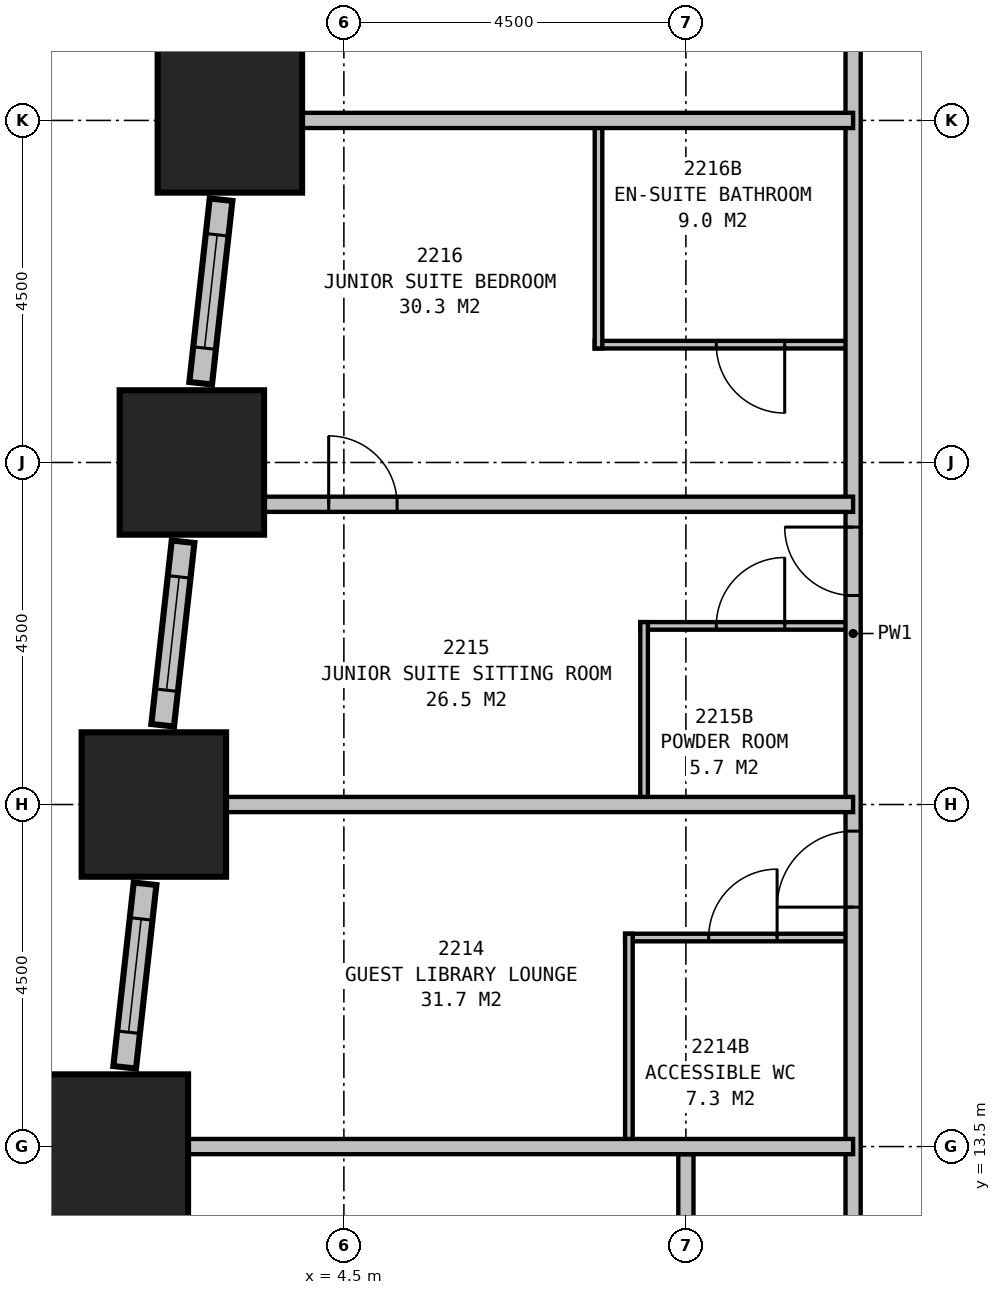
"""IFC4 building model, lengths in metres.
Left out: names, types, materials, properties, quantities, classifications, styles, units other than length and angle.
Written with IfcOpenShell. Run it as: python <this file> out.ifc"""

import sys

from ifc_helpers import new_model, si_unit, direction, frame, frame_2d, origin, origin_2d, place, context, subcontext, project, spatial, rectangle, extrude, element, fill, save


model = new_model("IFC4")
c1 = context("Model", 3, precision=1e-05, world=origin(), true_north=direction((0.0, 1.0)))
c2 = subcontext(c1, "Body", "Model", "MODEL_VIEW")
j1 = project(units=[si_unit("LENGTHUNIT", "METRE"), si_unit("PLANEANGLEUNIT", "RADIAN")], contexts=[c1])
p1 = place(None, origin())
s1 = spatial("IfcSite", under=j1, at=p1, CompositionType="ELEMENT")
p2 = place(p1, origin())
s2 = spatial("IfcBuilding", under=s1, at=p2, CompositionType="ELEMENT")
p3 = place(p2, frame((0.0, 0.0, 89.9)))
s3 = spatial("IfcBuildingStorey", under=s2, at=p3, CompositionType="ELEMENT", Elevation=89.9)
for number, where, z_axis, x_axis in (
    (1, (3.0, 27.0, 0.0), (0.0, 0.0, 1.0), (1.0, 0.0, 0.0)),
    (2, (2.5, 22.5, 0.0), (0.0, 0.0, 1.0), (1.0, 0.0, 0.0)),
    (3, (2.0, 18.0, 0.0), (0.0, 0.0, 1.0), (1.0, 0.0, 0.0)),
    (4, (1.5, 13.5, 0.0), (0.0, 0.0, 1.0), (1.0, 0.0, 0.0)),
):
    element("IfcColumn", number, at=place(p3, frame(where, z_axis=z_axis, x_axis=x_axis)), inside=s3, PredefinedType="COLUMN", context=c2, shape_type="SweptSolid", body=[
        extrude(rectangle(XDim=1.9, YDim=1.9, at=origin_2d()), origin(), (0.0, 0.0, 1.0), 3.5),
    ])
p4 = place(p3, frame((2.884, 25.957, 0.0), z_axis=(0.0, 0.0, 1.0), x_axis=(-0.110343286306, -0.993893535127, 0.0)))
e5 = element("IfcWall", 5, at=p4, inside=s3, PredefinedType="STANDARD", context=c2, shape_type="SweptSolid", body=[
    extrude(rectangle(XDim=2.429, YDim=0.3, at=frame_2d((1.215, 0.0))), origin(), (0.0, 0.0, 1.0), 2.15),
])
p5 = place(p4, frame((0.465, 0.0, 0.5)))
e6 = element("IfcOpeningElement", 6, at=p5, cuts=e5, PredefinedType="OPENING", context=c2, shape_type="SweptSolid", body=[
    extrude(rectangle(XDim=1.5, YDim=1.5, at=frame_2d((0.75, 0.75))), frame((0.0, 0.16, 0.0), z_axis=(0.0, -1.0, 0.0), x_axis=(1.0, 0.0, 0.0)), (0.0, 0.0, 1.0), 0.32),
])
p6 = place(p3, frame((2.384, 21.457, 0.0), z_axis=(0.0, 0.0, 1.0), x_axis=(-0.110343286306, -0.993893535127, 0.0)))
e7 = element("IfcWall", 7, at=p6, inside=s3, PredefinedType="STANDARD", context=c2, shape_type="SweptSolid", body=[
    extrude(rectangle(XDim=2.429, YDim=0.3, at=frame_2d((1.215, 0.0))), origin(), (0.0, 0.0, 1.0), 2.15),
])
p7 = place(p6, frame((0.465, 0.0, 0.5)))
e8 = element("IfcOpeningElement", 8, at=p7, cuts=e7, PredefinedType="OPENING", context=c2, shape_type="SweptSolid", body=[
    extrude(rectangle(XDim=1.5, YDim=1.5, at=frame_2d((0.75, 0.75))), frame((0.0, 0.16, 0.0), z_axis=(0.0, -1.0, 0.0), x_axis=(1.0, 0.0, 0.0)), (0.0, 0.0, 1.0), 0.32),
])
p8 = place(p3, frame((1.884, 16.957, 0.0), z_axis=(0.0, 0.0, 1.0), x_axis=(-0.110343286306, -0.993893535127, 0.0)))
e9 = element("IfcWall", 9, at=p8, inside=s3, PredefinedType="STANDARD", context=c2, shape_type="SweptSolid", body=[
    extrude(rectangle(XDim=2.429, YDim=0.3, at=frame_2d((1.215, 0.0))), origin(), (0.0, 0.0, 1.0), 2.15),
])
p9 = place(p8, frame((0.465, 0.0, 0.5)))
e10 = element("IfcOpeningElement", 10, at=p9, cuts=e9, PredefinedType="OPENING", context=c2, shape_type="SweptSolid", body=[
    extrude(rectangle(XDim=1.5, YDim=1.5, at=frame_2d((0.75, 0.75))), frame((0.0, 0.16, 0.0), z_axis=(0.0, -1.0, 0.0), x_axis=(1.0, 0.0, 0.0)), (0.0, 0.0, 1.0), 0.32),
])
p10 = place(p3, frame((11.2, 10.6, 0.0), z_axis=(0.0, 0.0, 1.0), x_axis=(0.0, 1.0, 0.0)))
e11 = element("IfcWall", 11, at=p10, inside=s3, PredefinedType="PARTITIONING", context=c2, shape_type="SweptSolid", body=[
    extrude(rectangle(XDim=19.3, YDim=0.2, at=frame_2d((9.65, 0.0))), origin(), (0.0, 0.0, 1.0), 3.25),
])
p11 = place(p10, frame((6.05, 0.0, 0.0)))
e12 = element("IfcOpeningElement", 12, at=p11, cuts=e11, PredefinedType="OPENING", context=c2, shape_type="SweptSolid", body=[
    extrude(rectangle(XDim=1.0, YDim=2.1, at=frame_2d((0.5, 1.05))), frame((0.0, 0.11, 0.0), z_axis=(0.0, -1.0, 0.0), x_axis=(1.0, 0.0, 0.0)), (0.0, 0.0, 1.0), 0.22),
])
p12 = place(p10, frame((10.15, 0.0, 0.0)))
e13 = element("IfcOpeningElement", 13, at=p12, cuts=e11, PredefinedType="OPENING", context=c2, shape_type="SweptSolid", body=[
    extrude(rectangle(XDim=0.9, YDim=2.1, at=frame_2d((0.45, 1.05))), frame((0.0, 0.11, 0.0), z_axis=(0.0, -1.0, 0.0), x_axis=(1.0, 0.0, 0.0)), (0.0, 0.0, 1.0), 0.22),
])
p13 = place(p3, frame((11.2, 18.0, 0.0), z_axis=(0.0, 0.0, 1.0), x_axis=(-1.0, 0.0, 0.0)))
e14 = element("IfcWall", 14, at=p13, inside=s3, PredefinedType="PARTITIONING", context=c2, shape_type="SweptSolid", body=[
    extrude(rectangle(XDim=9.199, YDim=0.2, at=frame_2d((4.6, 0.0))), origin(), (0.0, 0.0, 1.0), 2.25),
])
p14 = place(p3, frame((11.2, 21.95, 0.0), z_axis=(0.0, 0.0, 1.0), x_axis=(-1.0, 0.0, 0.0)))
e15 = element("IfcWall", 15, at=p14, inside=s3, PredefinedType="PARTITIONING", context=c2, shape_type="SweptSolid", body=[
    extrude(rectangle(XDim=8.76, YDim=0.2, at=frame_2d((4.38, 0.0))), origin(), (0.0, 0.0, 1.0), 3.25),
])
p15 = place(p14, frame((6.9, 0.0, 0.0), z_axis=(0.0, 0.0, 1.0), x_axis=(-1.0, 0.0, 0.0)))
e16 = element("IfcOpeningElement", 16, at=p15, cuts=e15, PredefinedType="OPENING", context=c2, shape_type="SweptSolid", body=[
    extrude(rectangle(XDim=0.9, YDim=2.1, at=frame_2d((0.45, 1.05))), frame((0.0, 0.11, 0.0), z_axis=(0.0, -1.0, 0.0), x_axis=(1.0, 0.0, 0.0)), (0.0, 0.0, 1.0), 0.22),
])
p16 = place(p3, frame((8.25, 13.5, 0.0), z_axis=(0.0, 0.0, 1.0), x_axis=(0.0, 1.0, 0.0)))
e17 = element("IfcWall", 17, at=p16, inside=s3, PredefinedType="PLUMBINGWALL", context=c2, shape_type="SweptSolid", body=[
    extrude(rectangle(XDim=2.8, YDim=0.1, at=frame_2d((1.4, 0.0))), origin(), (0.0, 0.0, 1.0), 3.25),
])
p17 = place(p3, frame((11.2, 16.25, 0.0), z_axis=(0.0, 0.0, 1.0), x_axis=(-1.0, 0.0, 0.0)))
e18 = element("IfcWall", 18, at=p17, inside=s3, PredefinedType="PLUMBINGWALL", context=c2, shape_type="SweptSolid", body=[
    extrude(rectangle(XDim=3.0, YDim=0.1, at=frame_2d((1.5, 0.0))), origin(), (0.0, 0.0, 1.0), 3.25),
])
p18 = place(p17, frame((1.9, 0.0, 0.0), z_axis=(0.0, 0.0, 1.0), x_axis=(-1.0, 0.0, 0.0)))
e19 = element("IfcOpeningElement", 19, at=p18, cuts=e18, PredefinedType="OPENING", context=c2, shape_type="SweptSolid", body=[
    extrude(rectangle(XDim=0.9, YDim=2.1, at=frame_2d((0.45, 1.05))), frame((0.0, 0.06, 0.0), z_axis=(0.0, -1.0, 0.0), x_axis=(1.0, 0.0, 0.0)), (0.0, 0.0, 1.0), 0.12),
])
p19 = place(p3, frame((8.45, 18.0, 0.0), z_axis=(0.0, 0.0, 1.0), x_axis=(0.0, 1.0, 0.0)))
e20 = element("IfcWall", 20, at=p19, inside=s3, PredefinedType="PLUMBINGWALL", context=c2, shape_type="SweptSolid", body=[
    extrude(rectangle(XDim=2.4, YDim=0.1, at=frame_2d((1.2, 0.0))), origin(), (0.0, 0.0, 1.0), 3.25),
])
p20 = place(p3, frame((11.2, 20.35, 0.0), z_axis=(0.0, 0.0, 1.0), x_axis=(-1.0, 0.0, 0.0)))
e21 = element("IfcWall", 21, at=p20, inside=s3, PredefinedType="PLUMBINGWALL", context=c2, shape_type="SweptSolid", body=[
    extrude(rectangle(XDim=2.8, YDim=0.1, at=frame_2d((1.4, 0.0))), origin(), (0.0, 0.0, 1.0), 3.25),
])
p21 = place(p20, frame((1.8, 0.0, 0.0), z_axis=(0.0, 0.0, 1.0), x_axis=(-1.0, 0.0, 0.0)))
e22 = element("IfcOpeningElement", 22, at=p21, cuts=e21, PredefinedType="OPENING", context=c2, shape_type="SweptSolid", body=[
    extrude(rectangle(XDim=0.9, YDim=2.1, at=frame_2d((0.45, 1.05))), frame((0.0, 0.06, 0.0), z_axis=(0.0, -1.0, 0.0), x_axis=(1.0, 0.0, 0.0)), (0.0, 0.0, 1.0), 0.12),
])
p22 = place(p3, frame((7.85, 24.0, 0.0), z_axis=(0.0, 0.0, 1.0), x_axis=(0.0, 1.0, 0.0)))
e23 = element("IfcWall", 23, at=p22, inside=s3, PredefinedType="PLUMBINGWALL", context=c2, shape_type="SweptSolid", body=[
    extrude(rectangle(XDim=3.0, YDim=0.1, at=frame_2d((1.5, 0.0))), origin(), (0.0, 0.0, 1.0), 3.25),
])
p23 = place(p3, frame((11.2, 24.05, 0.0), z_axis=(0.0, 0.0, 1.0), x_axis=(-1.0, 0.0, 0.0)))
e24 = element("IfcWall", 24, at=p23, inside=s3, PredefinedType="PLUMBINGWALL", context=c2, shape_type="SweptSolid", body=[
    extrude(rectangle(XDim=3.4, YDim=0.1, at=frame_2d((1.7, 0.0))), origin(), (0.0, 0.0, 1.0), 3.25),
])
p24 = place(p23, frame((0.9, 0.0, 0.0)))
e25 = element("IfcOpeningElement", 25, at=p24, cuts=e24, PredefinedType="OPENING", context=c2, shape_type="SweptSolid", body=[
    extrude(rectangle(XDim=0.9, YDim=2.1, at=frame_2d((0.45, 1.05))), frame((0.0, 0.06, 0.0), z_axis=(0.0, -1.0, 0.0), x_axis=(1.0, 0.0, 0.0)), (0.0, 0.0, 1.0), 0.12),
])
p25 = place(p3, frame((11.2, 13.5, 0.0), z_axis=(0.0, 0.0, 1.0), x_axis=(-1.0, 0.0, 0.0)))
e26 = element("IfcWall", 26, at=p25, inside=s3, PredefinedType="PARTITIONING", context=c2, shape_type="SweptSolid", body=[
    extrude(rectangle(XDim=9.921, YDim=0.2, at=frame_2d((4.96, 0.0))), origin(), (0.0, 0.0, 1.0), 1.95),
])
p26 = place(p3, frame((9.0, 4.6, 0.0), z_axis=(0.0, 0.0, 1.0), x_axis=(0.0, 1.0, 0.0)))
e27 = element("IfcWall", 27, at=p26, inside=s3, PredefinedType="PARTITIONING", context=c2, shape_type="SweptSolid", body=[
    extrude(rectangle(XDim=8.8, YDim=0.2, at=frame_2d((4.4, 0.0))), origin(), (0.0, 0.0, 1.0), 2.25),
])
p27 = place(p26, frame((4.05, 0.0, 0.0)))
e28 = element("IfcOpeningElement", 28, at=p27, cuts=e27, PredefinedType="OPENING", context=c2, shape_type="SweptSolid", body=[
    extrude(rectangle(XDim=0.9, YDim=2.1, at=frame_2d((0.45, 1.05))), frame((0.0, 0.11, 0.0), z_axis=(0.0, -1.0, 0.0), x_axis=(1.0, 0.0, 0.0)), (0.0, 0.0, 1.0), 0.22),
])
p28 = place(p3, frame((11.2, 27.0, 0.0), z_axis=(0.0, 0.0, 1.0), x_axis=(-1.0, 0.0, 0.0)))
e29 = element("IfcWall", 29, at=p28, inside=s3, PredefinedType="PARTITIONING", context=c2, shape_type="SweptSolid", body=[
    extrude(rectangle(XDim=7.977, YDim=0.2, at=frame_2d((3.988, 0.0))), origin(), (0.0, 0.0, 1.0), 1.95),
])
p29 = place(p5, origin())
e30 = element("IfcWindow", 30, at=p29, inside=s3, PartitioningType="SINGLE_PANEL", PredefinedType="WINDOW", context=c2, shape_type="SweptSolid", body=[
    extrude(rectangle(XDim=1.5, YDim=1.5, at=frame_2d((0.75, 0.75))), frame((0.0, 0.03, 0.0), z_axis=(0.0, -1.0, 0.0), x_axis=(1.0, 0.0, 0.0)), (0.0, 0.0, 1.0), 0.06),
])
fill(e6, e30)
p30 = place(p7, origin())
e31 = element("IfcWindow", 31, at=p30, inside=s3, PartitioningType="SINGLE_PANEL", PredefinedType="WINDOW", context=c2, shape_type="SweptSolid", body=[
    extrude(rectangle(XDim=1.5, YDim=1.5, at=frame_2d((0.75, 0.75))), frame((0.0, 0.03, 0.0), z_axis=(0.0, -1.0, 0.0), x_axis=(1.0, 0.0, 0.0)), (0.0, 0.0, 1.0), 0.06),
])
fill(e8, e31)
p31 = place(p9, origin())
e32 = element("IfcWindow", 32, at=p31, inside=s3, PartitioningType="SINGLE_PANEL", PredefinedType="WINDOW", context=c2, shape_type="SweptSolid", body=[
    extrude(rectangle(XDim=1.5, YDim=1.5, at=frame_2d((0.75, 0.75))), frame((0.0, 0.03, 0.0), z_axis=(0.0, -1.0, 0.0), x_axis=(1.0, 0.0, 0.0)), (0.0, 0.0, 1.0), 0.06),
])
fill(e10, e32)
p32 = place(p11, origin())
e33 = element("IfcDoor", 33, at=p32, inside=s3, OperationType="SINGLE_SWING_LEFT", PredefinedType="DOOR", context=c2, shape_type="SweptSolid", body=[
    extrude(rectangle(XDim=1.0, YDim=2.1, at=frame_2d((0.5, 1.05))), frame((0.0, 0.025, 0.0), z_axis=(0.0, -1.0, 0.0), x_axis=(1.0, 0.0, 0.0)), (0.0, 0.0, 1.0), 0.05),
])
fill(e12, e33)
p33 = place(p12, origin())
e34 = element("IfcDoor", 34, at=p33, inside=s3, OperationType="SINGLE_SWING_RIGHT", PredefinedType="DOOR", context=c2, shape_type="SweptSolid", body=[
    extrude(rectangle(XDim=0.9, YDim=2.1, at=frame_2d((0.45, 1.05))), frame((0.0, 0.025, 0.0), z_axis=(0.0, -1.0, 0.0), x_axis=(1.0, 0.0, 0.0)), (0.0, 0.0, 1.0), 0.05),
])
fill(e13, e34)
p34 = place(p15, origin())
e35 = element("IfcDoor", 35, at=p34, inside=s3, OperationType="SINGLE_SWING_LEFT", PredefinedType="DOOR", context=c2, shape_type="SweptSolid", body=[
    extrude(rectangle(XDim=0.9, YDim=2.1, at=frame_2d((0.45, 1.05))), frame((0.0, 0.025, 0.0), z_axis=(0.0, -1.0, 0.0), x_axis=(1.0, 0.0, 0.0)), (0.0, 0.0, 1.0), 0.05),
])
fill(e16, e35)
p35 = place(p18, origin())
e36 = element("IfcDoor", 36, at=p35, inside=s3, OperationType="SINGLE_SWING_RIGHT", PredefinedType="DOOR", context=c2, shape_type="SweptSolid", body=[
    extrude(rectangle(XDim=0.9, YDim=2.1, at=frame_2d((0.45, 1.05))), frame((0.0, 0.025, 0.0), z_axis=(0.0, -1.0, 0.0), x_axis=(1.0, 0.0, 0.0)), (0.0, 0.0, 1.0), 0.05),
])
fill(e19, e36)
p36 = place(p21, origin())
e37 = element("IfcDoor", 37, at=p36, inside=s3, OperationType="SINGLE_SWING_RIGHT", PredefinedType="DOOR", context=c2, shape_type="SweptSolid", body=[
    extrude(rectangle(XDim=0.9, YDim=2.1, at=frame_2d((0.45, 1.05))), frame((0.0, 0.025, 0.0), z_axis=(0.0, -1.0, 0.0), x_axis=(1.0, 0.0, 0.0)), (0.0, 0.0, 1.0), 0.05),
])
fill(e22, e37)
p37 = place(p24, origin())
e38 = element("IfcDoor", 38, at=p37, inside=s3, OperationType="SINGLE_SWING_LEFT", PredefinedType="DOOR", context=c2, shape_type="SweptSolid", body=[
    extrude(rectangle(XDim=0.9, YDim=2.1, at=frame_2d((0.45, 1.05))), frame((0.0, 0.025, 0.0), z_axis=(0.0, -1.0, 0.0), x_axis=(1.0, 0.0, 0.0)), (0.0, 0.0, 1.0), 0.05),
])
fill(e25, e38)
save(model, sys.argv[1])
